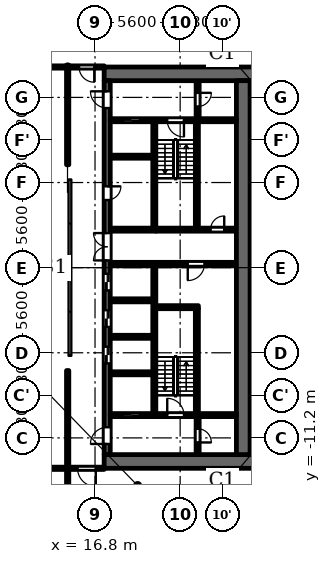
"""IFC4 building model, lengths in metres.
Left out: names, types, materials, properties, quantities, classifications, styles, units other than length and angle.
Written with IfcOpenShell. Run it as: python <this file> out.ifc"""

import sys

from ifc_helpers import new_model, si_unit, direction, frame, frame_2d, origin, origin_2d, place, context, subcontext, project, spatial, polyline, rectangle, outline, extrude, element, fill, save


model = new_model("IFC4")
c1 = context("Model", 3, precision=1e-05, world=origin(), true_north=direction((0.0, 1.0)))
c2 = subcontext(c1, "Body", "Model", "MODEL_VIEW")
j1 = project(units=[si_unit("LENGTHUNIT", "METRE"), si_unit("PLANEANGLEUNIT", "RADIAN")], contexts=[c1])
p1 = place(None, origin())
s1 = spatial("IfcSite", under=j1, at=p1, CompositionType="ELEMENT")
p2 = place(p1, origin())
s2 = spatial("IfcBuilding", under=s1, at=p2, CompositionType="ELEMENT")
p3 = place(p2, origin())
s3 = spatial("IfcBuildingStorey", under=s2, at=p3, CompositionType="ELEMENT", Elevation=0.0)
for number, where, z_axis, x_axis in (
    (1, (28.0, -11.2, 0.0), (0.0, 0.0, 1.0), (1.0, 0.0, 0.0)),
    (2, (28.0, -5.6, 0.0), (0.0, 0.0, 1.0), (1.0, 0.0, 0.0)),
    (3, (28.0, 0.0, 0.0), (0.0, 0.0, 1.0), (1.0, 0.0, 0.0)),
    (4, (28.0, 5.6, 0.0), (0.0, 0.0, 1.0), (1.0, 0.0, 0.0)),
    (5, (28.0, 11.2, 0.0), (0.0, 0.0, 1.0), (1.0, 0.0, 0.0)),
):
    element("IfcColumn", number, at=place(p3, frame(where, z_axis=z_axis, x_axis=x_axis)), inside=s3, PredefinedType="COLUMN", context=c2, shape_type="SweptSolid", body=[
        extrude(rectangle(XDim=1.8, YDim=1.8, at=origin_2d()), origin(), (0.0, 0.0, 1.0), 6.5),
    ])
p4 = place(p3, frame((20.7, 2.6, 0.0), z_axis=(0.0, 0.0, 1.0), x_axis=(0.0, 1.0, 0.0)))
e6 = element("IfcWall", 6, at=p4, inside=s3, PredefinedType="SHEAR", context=c2, shape_type="SweptSolid", body=[
    extrude(rectangle(XDim=7.0, YDim=0.2, at=frame_2d((3.5, 0.0))), origin(), (0.0, 0.0, 1.0), 6.15),
])
p5 = place(p3, frame((20.7, -9.6, 0.0), z_axis=(0.0, 0.0, 1.0), x_axis=(0.0, 1.0, 0.0)))
e7 = element("IfcWall", 7, at=p5, inside=s3, PredefinedType="SHEAR", context=c2, shape_type="SweptSolid", body=[
    extrude(rectangle(XDim=9.75, YDim=0.2, at=frame_2d((4.875, 0.0))), origin(), (0.0, 0.0, 1.0), 6.15),
])
p6 = place(p3, frame((20.8, 2.5, 0.0), z_axis=(0.0, 0.0, 1.0), x_axis=(1.0, 0.0, 0.0)))
e8 = element("IfcWall", 8, at=p6, inside=s3, PredefinedType="SHEAR", context=c2, shape_type="SweptSolid", body=[
    extrude(rectangle(XDim=5.3, YDim=0.2, at=frame_2d((2.65, 0.0))), origin(), (0.0, 0.0, 1.0), 6.15),
])
p7 = place(p6, frame((3.6, 0.0, 0.0)))
e9 = element("IfcOpeningElement", 9, at=p7, cuts=e8, PredefinedType="OPENING", context=c2, shape_type="SweptSolid", body=[
    extrude(rectangle(XDim=0.9, YDim=2.1, at=frame_2d((0.45, 1.05))), frame((0.0, 0.11, 0.0), z_axis=(0.0, -1.0, 0.0), x_axis=(1.0, 0.0, 0.0)), (0.0, 0.0, 1.0), 0.22),
])
p8 = place(p3, frame((20.8, 0.25, 0.0), z_axis=(0.0, 0.0, 1.0), x_axis=(1.0, 0.0, 0.0)))
e10 = element("IfcWall", 10, at=p8, inside=s3, PredefinedType="PARTITIONING", context=c2, shape_type="SweptSolid", body=[
    extrude(rectangle(XDim=5.3, YDim=0.2, at=frame_2d((2.65, 0.0))), origin(), (0.0, 0.0, 1.0), 6.15),
])
p9 = place(p8, frame((2.1, 0.0, 0.0)))
e11 = element("IfcOpeningElement", 11, at=p9, cuts=e10, PredefinedType="OPENING", context=c2, shape_type="SweptSolid", body=[
    extrude(rectangle(XDim=1.1, YDim=2.1, at=frame_2d((0.55, 1.05))), frame((0.0, 0.11, 0.0), z_axis=(0.0, -1.0, 0.0), x_axis=(1.0, 0.0, 0.0)), (0.0, 0.0, 1.0), 0.22),
])
for number, where, z_axis, x_axis in (
    (12, (17.4, 12.75, 0.0), (0.0, 0.0, 1.0), (1.0, 0.0, 0.0)),
    (13, (17.4, -12.75, 0.0), (0.0, 0.0, 1.0), (1.0, 0.0, 0.0)),
):
    element("IfcWall", number, at=place(p3, frame(where, z_axis=z_axis, x_axis=x_axis)), inside=s3, PredefinedType="SHEAR", context=c2, shape_type="SweptSolid", body=[
        extrude(rectangle(XDim=10.4, YDim=0.9, at=frame_2d((5.2, 0.0))), origin(), (0.0, 0.0, 1.0), 6.15),
    ])
p10 = place(p3, frame((17.6, -12.3, 0.0), z_axis=(0.0, 0.0, 1.0), x_axis=(0.0, 1.0, 0.0)))
e14 = element("IfcWall", 14, at=p10, inside=s3, PredefinedType="SHEAR", context=c2, shape_type="SweptSolid", body=[
    extrude(rectangle(XDim=24.6, YDim=0.4, at=frame_2d((12.3, 0.0))), origin(), (0.0, 0.0, 1.0), 6.15),
])
p11 = place(p10, frame((6.0, 0.0, 0.0)))
e15 = element("IfcOpeningElement", 15, at=p11, cuts=e14, PredefinedType="OPENING", context=c2, shape_type="SweptSolid", body=[
    extrude(rectangle(XDim=1.1, YDim=2.1, at=frame_2d((0.55, 1.05))), frame((0.0, 0.21, 0.0), z_axis=(0.0, -1.0, 0.0), x_axis=(1.0, 0.0, 0.0)), (0.0, 0.0, 1.0), 0.42),
])
p12 = place(p10, frame((8.4, 0.0, 0.0)))
e16 = element("IfcOpeningElement", 16, at=p12, cuts=e14, PredefinedType="OPENING", context=c2, shape_type="SweptSolid", body=[
    extrude(rectangle(XDim=1.1, YDim=2.1, at=frame_2d((0.55, 1.05))), frame((0.0, 0.21, 0.0), z_axis=(0.0, -1.0, 0.0), x_axis=(1.0, 0.0, 0.0)), (0.0, 0.0, 1.0), 0.42),
])
p13 = place(p10, frame((10.8, 0.0, 0.0)))
e17 = element("IfcOpeningElement", 17, at=p13, cuts=e14, PredefinedType="OPENING", context=c2, shape_type="SweptSolid", body=[
    extrude(rectangle(XDim=1.1, YDim=2.1, at=frame_2d((0.55, 1.05))), frame((0.0, 0.21, 0.0), z_axis=(0.0, -1.0, 0.0), x_axis=(1.0, 0.0, 0.0)), (0.0, 0.0, 1.0), 0.42),
])
p14 = place(p10, frame((16.75, 0.0, 0.0)))
e18 = element("IfcOpeningElement", 18, at=p14, cuts=e14, PredefinedType="OPENING", context=c2, shape_type="SweptSolid", body=[
    extrude(rectangle(XDim=0.9, YDim=2.1, at=frame_2d((0.45, 1.05))), frame((0.0, 0.21, 0.0), z_axis=(0.0, -1.0, 0.0), x_axis=(1.0, 0.0, 0.0)), (0.0, 0.0, 1.0), 0.42),
])
p15 = place(p10, frame((22.8, 0.0, 0.0)))
e19 = element("IfcOpeningElement", 19, at=p15, cuts=e14, PredefinedType="OPENING", context=c2, shape_type="SweptSolid", body=[
    extrude(rectangle(XDim=1.1, YDim=2.1, at=frame_2d((0.55, 1.05))), frame((0.0, 0.21, 0.0), z_axis=(0.0, -1.0, 0.0), x_axis=(1.0, 0.0, 0.0)), (0.0, 0.0, 1.0), 0.42),
])
p16 = place(p10, frame((0.7, 0.0, 0.0)))
e20 = element("IfcOpeningElement", 20, at=p16, cuts=e14, PredefinedType="OPENING", context=c2, shape_type="SweptSolid", body=[
    extrude(rectangle(XDim=1.1, YDim=2.1, at=frame_2d((0.55, 1.05))), frame((0.0, 0.21, 0.0), z_axis=(0.0, -1.0, 0.0), x_axis=(1.0, 0.0, 0.0)), (0.0, 0.0, 1.0), 0.42),
])
p17 = place(p10, frame((12.775, 0.0, 0.0)))
e21 = element("IfcOpeningElement", 21, at=p17, cuts=e14, PredefinedType="OPENING", context=c2, shape_type="SweptSolid", body=[
    extrude(rectangle(XDim=1.8, YDim=2.1, at=frame_2d((0.9, 1.05))), frame((0.0, 0.21, 0.0), z_axis=(0.0, -1.0, 0.0), x_axis=(1.0, 0.0, 0.0)), (0.0, 0.0, 1.0), 0.42),
])
p18 = place(p3, frame((26.55, -12.3, 0.0), z_axis=(0.0, 0.0, 1.0), x_axis=(0.0, 1.0, 0.0)))
e22 = element("IfcWall", 22, at=p18, inside=s3, PredefinedType="SHEAR", context=c2, shape_type="SweptSolid", body=[
    extrude(rectangle(XDim=24.6, YDim=0.9, at=frame_2d((12.3, 0.0))), origin(), (0.0, 0.0, 1.0), 6.15),
])
p19 = place(p3, frame((23.55, 9.8, 0.0), z_axis=(0.0, 0.0, 1.0), x_axis=(0.0, 1.0, 0.0)))
e23 = element("IfcWall", 23, at=p19, inside=s3, PredefinedType="PARTITIONING", context=c2, shape_type="SweptSolid", body=[
    extrude(rectangle(XDim=2.5, YDim=0.2, at=frame_2d((1.25, 0.0))), origin(), (0.0, 0.0, 1.0), 6.15),
])
p20 = place(p19, frame((0.8, 0.0, 0.0)))
e24 = element("IfcOpeningElement", 24, at=p20, cuts=e23, PredefinedType="OPENING", context=c2, shape_type="SweptSolid", body=[
    extrude(rectangle(XDim=0.9, YDim=2.1, at=frame_2d((0.45, 1.05))), frame((0.0, 0.11, 0.0), z_axis=(0.0, -1.0, 0.0), x_axis=(1.0, 0.0, 0.0)), (0.0, 0.0, 1.0), 0.22),
])
p21 = place(p3, frame((23.55, -12.3, 0.0), z_axis=(0.0, 0.0, 1.0), x_axis=(0.0, 1.0, 0.0)))
e25 = element("IfcWall", 25, at=p21, inside=s3, PredefinedType="PARTITIONING", context=c2, shape_type="SweptSolid", body=[
    extrude(rectangle(XDim=2.5, YDim=0.2, at=frame_2d((1.25, 0.0))), origin(), (0.0, 0.0, 1.0), 6.15),
])
p22 = place(p21, frame((0.8, 0.0, 0.0)))
e26 = element("IfcOpeningElement", 26, at=p22, cuts=e25, PredefinedType="OPENING", context=c2, shape_type="SweptSolid", body=[
    extrude(rectangle(XDim=0.9, YDim=2.1, at=frame_2d((0.45, 1.05))), frame((0.0, 0.11, 0.0), z_axis=(0.0, -1.0, 0.0), x_axis=(1.0, 0.0, 0.0)), (0.0, 0.0, 1.0), 0.22),
])
p23 = place(p3, frame((17.8, -9.7, 0.0), z_axis=(0.0, 0.0, 1.0), x_axis=(1.0, 0.0, 0.0)))
e27 = element("IfcWall", 27, at=p23, inside=s3, PredefinedType="SHEAR", context=c2, shape_type="SweptSolid", body=[
    extrude(rectangle(XDim=8.3, YDim=0.2, at=frame_2d((4.15, 0.0))), origin(), (0.0, 0.0, 1.0), 6.15),
])
p24 = place(p23, frame((0.85, 0.0, 0.0)))
e28 = element("IfcOpeningElement", 28, at=p24, cuts=e27, PredefinedType="OPENING", context=c2, shape_type="SweptSolid", body=[
    extrude(rectangle(XDim=1.1, YDim=2.1, at=frame_2d((0.55, 1.05))), frame((0.0, 0.11, 0.0), z_axis=(0.0, -1.0, 0.0), x_axis=(1.0, 0.0, 0.0)), (0.0, 0.0, 1.0), 0.22),
])
p25 = place(p23, frame((3.75, 0.0, 0.0)))
e29 = element("IfcOpeningElement", 29, at=p25, cuts=e27, PredefinedType="OPENING", context=c2, shape_type="SweptSolid", body=[
    extrude(rectangle(XDim=1.1, YDim=2.1, at=frame_2d((0.55, 1.05))), frame((0.0, 0.11, 0.0), z_axis=(0.0, -1.0, 0.0), x_axis=(1.0, 0.0, 0.0)), (0.0, 0.0, 1.0), 0.22),
])
for number, where, z_axis, x_axis in (
    (30, (17.8, -6.95, 0.0), (0.0, 0.0, 1.0), (1.0, 0.0, 0.0)),
    (31, (17.8, -4.55, 0.0), (0.0, 0.0, 1.0), (1.0, 0.0, 0.0)),
    (32, (17.8, -2.15, 0.0), (0.0, 0.0, 1.0), (1.0, 0.0, 0.0)),
):
    element("IfcWall", number, at=place(p3, frame(where, z_axis=z_axis, x_axis=x_axis)), inside=s3, PredefinedType="PARTITIONING", context=c2, shape_type="SweptSolid", body=[
        extrude(rectangle(XDim=2.8, YDim=0.2, at=frame_2d((1.4, 0.0))), origin(), (0.0, 0.0, 1.0), 6.15),
    ])
for number, where, z_axis, x_axis in (
    (33, (17.8, 0.25, 0.0), (0.0, 0.0, 1.0), (1.0, 0.0, 0.0)),
    (34, (17.8, 2.5, 0.0), (0.0, 0.0, 1.0), (1.0, 0.0, 0.0)),
):
    element("IfcWall", number, at=place(p3, frame(where, z_axis=z_axis, x_axis=x_axis)), inside=s3, PredefinedType="PARTITIONING", context=c2, shape_type="SweptSolid", body=[
        extrude(rectangle(XDim=3.0, YDim=0.2, at=frame_2d((1.5, 0.0))), origin(), (0.0, 0.0, 1.0), 6.15),
    ])
p26 = place(p3, frame((17.8, 7.3, 0.0), z_axis=(0.0, 0.0, 1.0), x_axis=(1.0, 0.0, 0.0)))
e35 = element("IfcWall", 35, at=p26, inside=s3, PredefinedType="PARTITIONING", context=c2, shape_type="SweptSolid", body=[
    extrude(rectangle(XDim=2.8, YDim=0.2, at=frame_2d((1.4, 0.0))), origin(), (0.0, 0.0, 1.0), 6.15),
])
p27 = place(p3, frame((17.8, 9.7, 0.0), z_axis=(0.0, 0.0, 1.0), x_axis=(1.0, 0.0, 0.0)))
e36 = element("IfcWall", 36, at=p27, inside=s3, PredefinedType="SHEAR", context=c2, shape_type="SweptSolid", body=[
    extrude(rectangle(XDim=8.3, YDim=0.2, at=frame_2d((4.15, 0.0))), origin(), (0.0, 0.0, 1.0), 6.15),
])
p28 = place(p27, frame((0.85, 0.0, 0.0)))
e37 = element("IfcOpeningElement", 37, at=p28, cuts=e36, PredefinedType="OPENING", context=c2, shape_type="SweptSolid", body=[
    extrude(rectangle(XDim=1.1, YDim=2.1, at=frame_2d((0.55, 1.05))), frame((0.0, 0.11, 0.0), z_axis=(0.0, -1.0, 0.0), x_axis=(1.0, 0.0, 0.0)), (0.0, 0.0, 1.0), 0.22),
])
p29 = place(p27, frame((3.75, 0.0, 0.0)))
e38 = element("IfcOpeningElement", 38, at=p29, cuts=e36, PredefinedType="OPENING", context=c2, shape_type="SweptSolid", body=[
    extrude(rectangle(XDim=1.1, YDim=2.1, at=frame_2d((0.55, 1.05))), frame((0.0, 0.11, 0.0), z_axis=(0.0, -1.0, 0.0), x_axis=(1.0, 0.0, 0.0)), (0.0, 0.0, 1.0), 0.22),
])
p30 = place(p3, frame((23.5, 2.6, 0.0), z_axis=(0.0, 0.0, 1.0), x_axis=(0.0, 1.0, 0.0)))
e39 = element("IfcWall", 39, at=p30, inside=s3, PredefinedType="SHEAR", context=c2, shape_type="SweptSolid", body=[
    extrude(rectangle(XDim=7.0, YDim=0.2, at=frame_2d((3.5, 0.0))), origin(), (0.0, 0.0, 1.0), 6.15),
])
p31 = place(p3, frame((23.5, -9.6, 0.0), z_axis=(0.0, 0.0, 1.0), x_axis=(0.0, 1.0, 0.0)))
e40 = element("IfcWall", 40, at=p31, inside=s3, PredefinedType="SHEAR", context=c2, shape_type="SweptSolid", body=[
    extrude(rectangle(XDim=6.9, YDim=0.2, at=frame_2d((3.45, 0.0))), origin(), (0.0, 0.0, 1.0), 6.15),
])
p32 = place(p3, frame((20.8, -2.6, 0.0), z_axis=(0.0, 0.0, 1.0), x_axis=(1.0, 0.0, 0.0)))
e41 = element("IfcWall", 41, at=p32, inside=s3, PredefinedType="SHEAR", context=c2, shape_type="SweptSolid", body=[
    extrude(rectangle(XDim=2.8, YDim=0.2, at=frame_2d((1.4, 0.0))), origin(), (0.0, 0.0, 1.0), 6.15),
])
p33 = place(p3, frame((-17.4, -13.2, 0.0), z_axis=(0.0, 0.0, 1.0), x_axis=(1.0, 0.0, 0.0)))
e42 = element("IfcWall", 42, at=p33, inside=s3, PredefinedType="PARTITIONING", context=c2, shape_type="SweptSolid", body=[
    extrude(rectangle(XDim=34.8, YDim=0.15, at=frame_2d((17.4, 0.0))), origin(), (0.0, 0.0, 1.0), 6.15),
])
p34 = place(p33, frame((13.95, 0.0, 0.0)))
e43 = element("IfcOpeningElement", 43, at=p34, cuts=e42, PredefinedType="OPENING", context=c2, shape_type="SweptSolid", body=[
    extrude(rectangle(XDim=1.8, YDim=2.1, at=frame_2d((0.9, 1.05))), frame((0.0, 0.085, 0.0), z_axis=(0.0, -1.0, 0.0), x_axis=(1.0, 0.0, 0.0)), (0.0, 0.0, 1.0), 0.17),
])
p35 = place(p33, frame((33.05, 0.0, 0.0)))
e44 = element("IfcOpeningElement", 44, at=p35, cuts=e42, PredefinedType="OPENING", context=c2, shape_type="SweptSolid", body=[
    extrude(rectangle(XDim=1.2, YDim=2.1, at=frame_2d((0.6, 1.05))), frame((0.0, 0.085, 0.0), z_axis=(0.0, -1.0, 0.0), x_axis=(1.0, 0.0, 0.0)), (0.0, 0.0, 1.0), 0.17),
])
p36 = place(p33, frame((0.65, 0.0, 0.0)))
e45 = element("IfcOpeningElement", 45, at=p36, cuts=e42, PredefinedType="OPENING", context=c2, shape_type="SweptSolid", body=[
    extrude(rectangle(XDim=1.2, YDim=2.1, at=frame_2d((0.6, 1.05))), frame((0.0, 0.085, 0.0), z_axis=(0.0, -1.0, 0.0), x_axis=(1.0, 0.0, 0.0)), (0.0, 0.0, 1.0), 0.17),
])
p37 = place(p3, frame((-17.4, 13.2, 0.0), z_axis=(0.0, 0.0, 1.0), x_axis=(1.0, 0.0, 0.0)))
e46 = element("IfcWall", 46, at=p37, inside=s3, PredefinedType="PARTITIONING", context=c2, shape_type="SweptSolid", body=[
    extrude(rectangle(XDim=34.8, YDim=0.15, at=frame_2d((17.4, 0.0))), origin(), (0.0, 0.0, 1.0), 6.15),
])
p38 = place(p37, frame((3.05, 0.0, 0.0)))
e47 = element("IfcOpeningElement", 47, at=p38, cuts=e46, PredefinedType="OPENING", context=c2, shape_type="SweptSolid", body=[
    extrude(rectangle(XDim=1.8, YDim=2.1, at=frame_2d((0.9, 1.05))), frame((0.0, 0.085, 0.0), z_axis=(0.0, -1.0, 0.0), x_axis=(1.0, 0.0, 0.0)), (0.0, 0.0, 1.0), 0.17),
])
p39 = place(p37, frame((0.75, 0.0, 0.0)))
e48 = element("IfcOpeningElement", 48, at=p39, cuts=e46, PredefinedType="OPENING", context=c2, shape_type="SweptSolid", body=[
    extrude(rectangle(XDim=1.0, YDim=2.1, at=frame_2d((0.5, 1.05))), frame((0.0, 0.085, 0.0), z_axis=(0.0, -1.0, 0.0), x_axis=(1.0, 0.0, 0.0)), (0.0, 0.0, 1.0), 0.17),
])
p40 = place(p37, frame((33.15, 0.0, 0.0)))
e49 = element("IfcOpeningElement", 49, at=p40, cuts=e46, PredefinedType="OPENING", context=c2, shape_type="SweptSolid", body=[
    extrude(rectangle(XDim=1.0, YDim=2.1, at=frame_2d((0.5, 1.05))), frame((0.0, 0.085, 0.0), z_axis=(0.0, -1.0, 0.0), x_axis=(1.0, 0.0, 0.0)), (0.0, 0.0, 1.0), 0.17),
])
p41 = place(p3, frame((15.0, -15.6, 0.0), z_axis=(0.0, 0.0, 1.0), x_axis=(0.0, 1.0, 0.0)))
e50 = element("IfcWall", 50, at=p41, inside=s3, PredefinedType="PARTITIONING", context=c2, shape_type="SweptSolid", body=[
    extrude(rectangle(XDim=2.325, YDim=0.15, at=frame_2d((1.163, 0.0))), origin(), (0.0, 0.0, 1.0), 6.15),
])
for number, where, z_axis, x_axis in (
    (51, (15.0, -13.125, 0.0), (0.0, 0.0, 1.0), (0.0, 1.0, 0.0)),
    (52, (15.0, 6.769, 0.0), (0.0, 0.0, 1.0), (0.0, 1.0, 0.0)),
):
    element("IfcWall", number, at=place(p3, frame(where, z_axis=z_axis, x_axis=x_axis)), inside=s3, PredefinedType="PARTITIONING", context=c2, shape_type="SweptSolid", body=[
        extrude(rectangle(XDim=6.356, YDim=0.15, at=frame_2d((3.178, 0.0))), origin(), (0.0, 0.0, 1.0), 6.15),
    ])
p42 = place(p3, origin())
e53 = element("IfcWall", 53, at=p42, inside=s3, PredefinedType="SOLIDWALL", context=c2, shape_type="SweptSolid", body=[
    extrude(outline(polyline([(14.937, 6.937), (13.849, 7.3), (13.8, 7.3), (13.8, 7.0), (14.7, 6.7), (15.0, 5.8), (15.3, 5.8), (15.3, 5.849), (14.937, 6.937)])), origin(), (0.0, 0.0, 1.0), 6.15),
])
e54 = element("IfcWall", 54, at=p42, inside=s3, PredefinedType="SOLIDWALL", context=c2, shape_type="SweptSolid", body=[
    extrude(outline(polyline([(14.937, -6.937), (15.3, -5.849), (15.3, -5.8), (15.0, -5.8), (14.7, -6.7), (13.8, -7.0), (13.8, -7.3), (13.849, -7.3), (14.937, -6.937)])), origin(), (0.0, 0.0, 1.0), 6.15),
])
p43 = place(p24, origin())
e55 = element("IfcDoor", 55, at=p43, inside=s3, OperationType="DOUBLE_DOOR_SLIDING", PredefinedType="DOOR", context=c2, shape_type="SweptSolid", body=[
    extrude(rectangle(XDim=1.1, YDim=2.1, at=frame_2d((0.55, 1.05))), frame((0.0, 0.025, 0.0), z_axis=(0.0, -1.0, 0.0), x_axis=(1.0, 0.0, 0.0)), (0.0, 0.0, 1.0), 0.05),
])
fill(e28, e55)
p44 = place(p11, origin())
e56 = element("IfcDoor", 56, at=p44, inside=s3, OperationType="DOUBLE_DOOR_SLIDING", PredefinedType="DOOR", context=c2, shape_type="SweptSolid", body=[
    extrude(rectangle(XDim=1.1, YDim=2.1, at=frame_2d((0.55, 1.05))), frame((0.0, 0.025, 0.0), z_axis=(0.0, -1.0, 0.0), x_axis=(1.0, 0.0, 0.0)), (0.0, 0.0, 1.0), 0.05),
])
fill(e15, e56)
p45 = place(p12, origin())
e57 = element("IfcDoor", 57, at=p45, inside=s3, OperationType="DOUBLE_DOOR_SLIDING", PredefinedType="DOOR", context=c2, shape_type="SweptSolid", body=[
    extrude(rectangle(XDim=1.1, YDim=2.1, at=frame_2d((0.55, 1.05))), frame((0.0, 0.025, 0.0), z_axis=(0.0, -1.0, 0.0), x_axis=(1.0, 0.0, 0.0)), (0.0, 0.0, 1.0), 0.05),
])
fill(e16, e57)
p46 = place(p13, origin())
e58 = element("IfcDoor", 58, at=p46, inside=s3, OperationType="DOUBLE_DOOR_SLIDING", PredefinedType="DOOR", context=c2, shape_type="SweptSolid", body=[
    extrude(rectangle(XDim=1.1, YDim=2.1, at=frame_2d((0.55, 1.05))), frame((0.0, 0.025, 0.0), z_axis=(0.0, -1.0, 0.0), x_axis=(1.0, 0.0, 0.0)), (0.0, 0.0, 1.0), 0.05),
])
fill(e17, e58)
p47 = place(p14, origin())
e59 = element("IfcDoor", 59, at=p47, inside=s3, OperationType="SINGLE_SWING_RIGHT", PredefinedType="DOOR", context=c2, shape_type="SweptSolid", body=[
    extrude(rectangle(XDim=0.9, YDim=2.1, at=frame_2d((0.45, 1.05))), frame((0.0, 0.025, 0.0), z_axis=(0.0, -1.0, 0.0), x_axis=(1.0, 0.0, 0.0)), (0.0, 0.0, 1.0), 0.05),
])
fill(e18, e59)
p48 = place(p28, origin())
e60 = element("IfcDoor", 60, at=p48, inside=s3, OperationType="DOUBLE_DOOR_SLIDING", PredefinedType="DOOR", context=c2, shape_type="SweptSolid", body=[
    extrude(rectangle(XDim=1.1, YDim=2.1, at=frame_2d((0.55, 1.05))), frame((0.0, 0.025, 0.0), z_axis=(0.0, -1.0, 0.0), x_axis=(1.0, 0.0, 0.0)), (0.0, 0.0, 1.0), 0.05),
])
fill(e37, e60)
p49 = place(p15, origin())
e61 = element("IfcDoor", 61, at=p49, inside=s3, OperationType="SINGLE_SWING_LEFT", PredefinedType="DOOR", context=c2, shape_type="SweptSolid", body=[
    extrude(rectangle(XDim=1.1, YDim=2.1, at=frame_2d((0.55, 1.05))), frame((0.0, 0.025, 0.0), z_axis=(0.0, -1.0, 0.0), x_axis=(1.0, 0.0, 0.0)), (0.0, 0.0, 1.0), 0.05),
])
fill(e19, e61)
p50 = place(p16, origin())
e62 = element("IfcDoor", 62, at=p50, inside=s3, OperationType="SINGLE_SWING_RIGHT", PredefinedType="DOOR", context=c2, shape_type="SweptSolid", body=[
    extrude(rectangle(XDim=1.1, YDim=2.1, at=frame_2d((0.55, 1.05))), frame((0.0, 0.025, 0.0), z_axis=(0.0, -1.0, 0.0), x_axis=(1.0, 0.0, 0.0)), (0.0, 0.0, 1.0), 0.05),
])
fill(e20, e62)
p51 = place(p20, origin())
e63 = element("IfcDoor", 63, at=p51, inside=s3, OperationType="SINGLE_SWING_RIGHT", PredefinedType="DOOR", context=c2, shape_type="SweptSolid", body=[
    extrude(rectangle(XDim=0.9, YDim=2.1, at=frame_2d((0.45, 1.05))), frame((0.0, 0.025, 0.0), z_axis=(0.0, -1.0, 0.0), x_axis=(1.0, 0.0, 0.0)), (0.0, 0.0, 1.0), 0.05),
])
fill(e24, e63)
p52 = place(p22, origin())
e64 = element("IfcDoor", 64, at=p52, inside=s3, OperationType="SINGLE_SWING_LEFT", PredefinedType="DOOR", context=c2, shape_type="SweptSolid", body=[
    extrude(rectangle(XDim=0.9, YDim=2.1, at=frame_2d((0.45, 1.05))), frame((0.0, 0.025, 0.0), z_axis=(0.0, -1.0, 0.0), x_axis=(1.0, 0.0, 0.0)), (0.0, 0.0, 1.0), 0.05),
])
fill(e26, e64)
p53 = place(p29, origin())
e65 = element("IfcDoor", 65, at=p53, inside=s3, OperationType="SINGLE_SWING_RIGHT", PredefinedType="DOOR", context=c2, shape_type="SweptSolid", body=[
    extrude(rectangle(XDim=1.1, YDim=2.1, at=frame_2d((0.55, 1.05))), frame((0.0, 0.025, 0.0), z_axis=(0.0, -1.0, 0.0), x_axis=(1.0, 0.0, 0.0)), (0.0, 0.0, 1.0), 0.05),
])
fill(e38, e65)
p54 = place(p25, origin())
e66 = element("IfcDoor", 66, at=p54, inside=s3, OperationType="SINGLE_SWING_RIGHT", PredefinedType="DOOR", context=c2, shape_type="SweptSolid", body=[
    extrude(rectangle(XDim=1.1, YDim=2.1, at=frame_2d((0.55, 1.05))), frame((0.0, 0.025, 0.0), z_axis=(0.0, -1.0, 0.0), x_axis=(1.0, 0.0, 0.0)), (0.0, 0.0, 1.0), 0.05),
])
fill(e29, e66)
p55 = place(p17, origin())
e67 = element("IfcDoor", 67, at=p55, inside=s3, OperationType="DOUBLE_DOOR_SINGLE_SWING", PredefinedType="DOOR", context=c2, shape_type="SweptSolid", body=[
    extrude(rectangle(XDim=1.8, YDim=2.1, at=frame_2d((0.9, 1.05))), frame((0.0, 0.025, 0.0), z_axis=(0.0, -1.0, 0.0), x_axis=(1.0, 0.0, 0.0)), (0.0, 0.0, 1.0), 0.05),
])
fill(e21, e67)
p56 = place(p9, origin())
e68 = element("IfcDoor", 68, at=p56, inside=s3, OperationType="SINGLE_SWING_LEFT", PredefinedType="DOOR", context=c2, shape_type="SweptSolid", body=[
    extrude(rectangle(XDim=1.1, YDim=2.1, at=frame_2d((0.55, 1.05))), frame((0.0, 0.025, 0.0), z_axis=(0.0, -1.0, 0.0), x_axis=(1.0, 0.0, 0.0)), (0.0, 0.0, 1.0), 0.05),
])
fill(e11, e68)
p57 = place(p7, origin())
e69 = element("IfcDoor", 69, at=p57, inside=s3, OperationType="SINGLE_SWING_LEFT", PredefinedType="DOOR", context=c2, shape_type="SweptSolid", body=[
    extrude(rectangle(XDim=0.9, YDim=2.1, at=frame_2d((0.45, 1.05))), frame((0.0, 0.025, 0.0), z_axis=(0.0, -1.0, 0.0), x_axis=(1.0, 0.0, 0.0)), (0.0, 0.0, 1.0), 0.05),
])
fill(e9, e69)
p58 = place(p40, origin())
e70 = element("IfcDoor", 70, at=p58, inside=s3, OperationType="SINGLE_SWING_RIGHT", PredefinedType="DOOR", context=c2, shape_type="SweptSolid", body=[
    extrude(rectangle(XDim=1.0, YDim=2.1, at=frame_2d((0.5, 1.05))), frame((0.0, 0.025, 0.0), z_axis=(0.0, -1.0, 0.0), x_axis=(1.0, 0.0, 0.0)), (0.0, 0.0, 1.0), 0.05),
])
fill(e49, e70)
p59 = place(p35, origin())
e71 = element("IfcDoor", 71, at=p59, inside=s3, OperationType="SINGLE_SWING_RIGHT", PredefinedType="DOOR", context=c2, shape_type="SweptSolid", body=[
    extrude(rectangle(XDim=1.2, YDim=2.1, at=frame_2d((0.6, 1.05))), frame((0.0, 0.025, 0.0), z_axis=(0.0, -1.0, 0.0), x_axis=(1.0, 0.0, 0.0)), (0.0, 0.0, 1.0), 0.05),
])
fill(e44, e71)
save(model, sys.argv[1])
